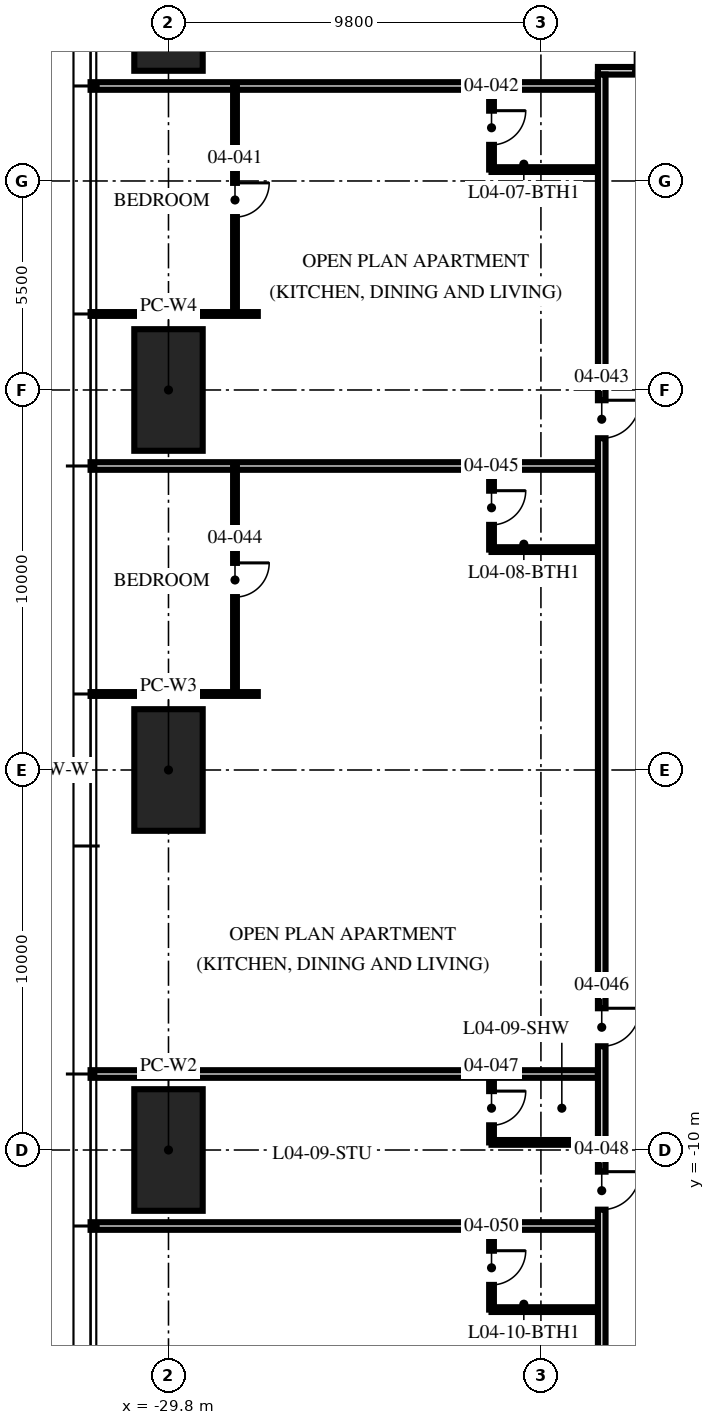
"""IFC4 building model, lengths in metres.
Left out: names, types, materials, properties, quantities, classifications, styles, units other than length and angle.
Written with IfcOpenShell. Run it as: python <this file> out.ifc"""

import sys

from ifc_helpers import new_model, si_unit, direction, frame, frame_2d, origin, origin_2d, place, context, subcontext, project, spatial, rectangle, hollow_rectangle, extrude, element, fill, save


model = new_model("IFC4")
c1 = context("Model", 3, precision=1e-05, world=origin(), true_north=direction((0.0, 1.0)))
c2 = subcontext(c1, "Body", "Model", "MODEL_VIEW")
j1 = project(units=[si_unit("LENGTHUNIT", "METRE"), si_unit("PLANEANGLEUNIT", "RADIAN")], contexts=[c1])
p1 = place(None, origin())
s1 = spatial("IfcSite", under=j1, at=p1, CompositionType="ELEMENT")
p2 = place(p1, origin())
s2 = spatial("IfcBuilding", under=s1, at=p2, CompositionType="ELEMENT")
p3 = place(p2, frame((0.0, 0.0, 21.0)))
s3 = spatial("IfcBuildingStorey", under=s2, at=p3, CompositionType="ELEMENT", Elevation=21.0)
for number, where, z_axis, x_axis in (
    (1, (-29.8, -10.0, 0.0), (0.0, 0.0, 1.0), (0.0, 1.0, 0.0)),
    (2, (-29.8, 0.0, 0.0), (0.0, 0.0, 1.0), (0.0, 1.0, 0.0)),
    (3, (-29.8, 10.0, 0.0), (0.0, 0.0, 1.0), (0.0, 1.0, 0.0)),
    (4, (-29.8, 20.0, 0.0), (0.0, 0.0, 1.0), (0.0, 1.0, 0.0)),
):
    element("IfcColumn", number, at=place(p3, frame(where, z_axis=z_axis, x_axis=x_axis)), inside=s3, PredefinedType="COLUMN", context=c2, shape_type="SweptSolid", body=[
        extrude(hollow_rectangle(XDim=3.2, YDim=1.8, WallThickness=0.2, at=origin_2d()), origin(), (0.0, 0.0, 1.0), 3.75),
    ])
p4 = place(p3, frame((-18.5, 18.0, 0.0), z_axis=(0.0, 0.0, 1.0), x_axis=(-1.0, 0.0, 0.0)))
e5 = element("IfcWall", 5, at=p4, inside=s3, PredefinedType="PARTITIONING", context=c2, shape_type="SweptSolid", body=[
    extrude(rectangle(XDim=13.35, YDim=0.2, at=frame_2d((6.675, 0.0))), origin(), (0.0, 0.0, 1.0), 2.3),
])
p5 = place(p3, frame((-27.45, 12.0, 0.0), z_axis=(0.0, 0.0, 1.0), x_axis=(-1.0, 0.0, 0.0)))
e6 = element("IfcWall", 6, at=p5, inside=s3, PredefinedType="PARTITIONING", context=c2, shape_type="SweptSolid", body=[
    extrude(rectangle(XDim=4.4, YDim=0.1, at=frame_2d((2.2, 0.0))), origin(), (0.0, 0.0, 1.0), 2.71),
])
p6 = place(p3, frame((-18.5, 8.0, 0.0), z_axis=(0.0, 0.0, 1.0), x_axis=(-1.0, 0.0, 0.0)))
e7 = element("IfcWall", 7, at=p6, inside=s3, PredefinedType="PARTITIONING", context=c2, shape_type="SweptSolid", body=[
    extrude(rectangle(XDim=13.35, YDim=0.2, at=frame_2d((6.675, 0.0))), origin(), (0.0, 0.0, 1.0), 2.71),
])
p7 = place(p3, frame((-27.45, 2.0, 0.0), z_axis=(0.0, 0.0, 1.0), x_axis=(-1.0, 0.0, 0.0)))
e8 = element("IfcWall", 8, at=p7, inside=s3, PredefinedType="PARTITIONING", context=c2, shape_type="SweptSolid", body=[
    extrude(rectangle(XDim=4.4, YDim=0.1, at=frame_2d((2.2, 0.0))), origin(), (0.0, 0.0, 1.0), 2.71),
])
for number, where, z_axis, x_axis in (
    (9, (-18.5, -8.0, 0.0), (0.0, 0.0, 1.0), (-1.0, 0.0, 0.0)),
    (10, (-18.5, -12.0, 0.0), (0.0, 0.0, 1.0), (-1.0, 0.0, 0.0)),
):
    element("IfcWall", number, at=place(p3, frame(where, z_axis=z_axis, x_axis=x_axis)), inside=s3, PredefinedType="PARTITIONING", context=c2, shape_type="SweptSolid", body=[
        extrude(rectangle(XDim=13.35, YDim=0.2, at=frame_2d((6.675, 0.0))), origin(), (0.0, 0.0, 1.0), 2.71),
    ])
p8 = place(p3, frame((-28.05, 18.0, 0.0), z_axis=(0.0, 0.0, 1.0), x_axis=(0.0, -1.0, 0.0)))
e11 = element("IfcWall", 11, at=p8, inside=s3, PredefinedType="PARTITIONING", context=c2, shape_type="SweptSolid", body=[
    extrude(rectangle(XDim=6.0, YDim=0.1, at=frame_2d((3.0, 0.0))), origin(), (0.0, 0.0, 1.0), 2.61),
])
p9 = place(p8, frame((2.55, 0.0, 0.0)))
e12 = element("IfcOpeningElement", 12, at=p9, cuts=e11, PredefinedType="OPENING", context=c2, shape_type="SweptSolid", body=[
    extrude(rectangle(XDim=0.9, YDim=2.1, at=frame_2d((0.45, 1.05))), frame((0.0, 0.06, 0.0), z_axis=(0.0, -1.0, 0.0), x_axis=(1.0, 0.0, 0.0)), (0.0, 0.0, 1.0), 0.12),
])
p10 = place(p3, frame((-21.3, 18.0, 0.0), z_axis=(0.0, 0.0, 1.0), x_axis=(0.0, -1.0, 0.0)))
e13 = element("IfcWall", 13, at=p10, inside=s3, PredefinedType="PARTITIONING", context=c2, shape_type="SweptSolid", body=[
    extrude(rectangle(XDim=2.2, YDim=0.125, at=frame_2d((1.1, 0.0))), origin(), (0.0, 0.0, 1.0), 3.5),
])
p11 = place(p10, frame((0.65, 0.0, 0.0)))
e14 = element("IfcOpeningElement", 14, at=p11, cuts=e13, PredefinedType="OPENING", context=c2, shape_type="SweptSolid", body=[
    extrude(rectangle(XDim=0.9, YDim=2.1, at=frame_2d((0.45, 1.05))), frame((0.0, 0.073, 0.0), z_axis=(0.0, -1.0, 0.0), x_axis=(1.0, 0.0, 0.0)), (0.0, 0.0, 1.0), 0.145),
])
p12 = place(p3, frame((-18.5, 15.8, 0.0), z_axis=(0.0, 0.0, 1.0), x_axis=(-1.0, 0.0, 0.0)))
e15 = element("IfcWall", 15, at=p12, inside=s3, PredefinedType="PARTITIONING", context=c2, shape_type="SweptSolid", body=[
    extrude(rectangle(XDim=2.8, YDim=0.125, at=frame_2d((1.4, 0.0))), origin(), (0.0, 0.0, 1.0), 3.5),
])
p13 = place(p3, frame((-28.05, 8.0, 0.0), z_axis=(0.0, 0.0, 1.0), x_axis=(0.0, -1.0, 0.0)))
e16 = element("IfcWall", 16, at=p13, inside=s3, PredefinedType="PARTITIONING", context=c2, shape_type="SweptSolid", body=[
    extrude(rectangle(XDim=6.0, YDim=0.1, at=frame_2d((3.0, 0.0))), origin(), (0.0, 0.0, 1.0), 2.61),
])
p14 = place(p13, frame((2.55, 0.0, 0.0)))
e17 = element("IfcOpeningElement", 17, at=p14, cuts=e16, PredefinedType="OPENING", context=c2, shape_type="SweptSolid", body=[
    extrude(rectangle(XDim=0.9, YDim=2.1, at=frame_2d((0.45, 1.05))), frame((0.0, 0.06, 0.0), z_axis=(0.0, -1.0, 0.0), x_axis=(1.0, 0.0, 0.0)), (0.0, 0.0, 1.0), 0.12),
])
p15 = place(p3, frame((-21.3, 8.0, 0.0), z_axis=(0.0, 0.0, 1.0), x_axis=(0.0, -1.0, 0.0)))
e18 = element("IfcWall", 18, at=p15, inside=s3, PredefinedType="PARTITIONING", context=c2, shape_type="SweptSolid", body=[
    extrude(rectangle(XDim=2.2, YDim=0.125, at=frame_2d((1.1, 0.0))), origin(), (0.0, 0.0, 1.0), 3.5),
])
p16 = place(p15, frame((0.65, 0.0, 0.0)))
e19 = element("IfcOpeningElement", 19, at=p16, cuts=e18, PredefinedType="OPENING", context=c2, shape_type="SweptSolid", body=[
    extrude(rectangle(XDim=0.9, YDim=2.1, at=frame_2d((0.45, 1.05))), frame((0.0, 0.073, 0.0), z_axis=(0.0, -1.0, 0.0), x_axis=(1.0, 0.0, 0.0)), (0.0, 0.0, 1.0), 0.145),
])
p17 = place(p3, frame((-18.5, 5.8, 0.0), z_axis=(0.0, 0.0, 1.0), x_axis=(-1.0, 0.0, 0.0)))
e20 = element("IfcWall", 20, at=p17, inside=s3, PredefinedType="PARTITIONING", context=c2, shape_type="SweptSolid", body=[
    extrude(rectangle(XDim=2.8, YDim=0.125, at=frame_2d((1.4, 0.0))), origin(), (0.0, 0.0, 1.0), 3.5),
])
p18 = place(p3, frame((-21.3, -8.0, 0.0), z_axis=(0.0, 0.0, 1.0), x_axis=(0.0, -1.0, 0.0)))
e21 = element("IfcWall", 21, at=p18, inside=s3, PredefinedType="PARTITIONING", context=c2, shape_type="SweptSolid", body=[
    extrude(rectangle(XDim=1.8, YDim=0.125, at=frame_2d((0.9, 0.0))), origin(), (0.0, 0.0, 1.0), 3.5),
])
p19 = place(p18, frame((0.45, 0.0, 0.0)))
e22 = element("IfcOpeningElement", 22, at=p19, cuts=e21, PredefinedType="OPENING", context=c2, shape_type="SweptSolid", body=[
    extrude(rectangle(XDim=0.9, YDim=2.1, at=frame_2d((0.45, 1.05))), frame((0.0, 0.073, 0.0), z_axis=(0.0, -1.0, 0.0), x_axis=(1.0, 0.0, 0.0)), (0.0, 0.0, 1.0), 0.145),
])
p20 = place(p3, frame((-18.5, -9.8, 0.0), z_axis=(0.0, 0.0, 1.0), x_axis=(-1.0, 0.0, 0.0)))
e23 = element("IfcWall", 23, at=p20, inside=s3, PredefinedType="PARTITIONING", context=c2, shape_type="SweptSolid", body=[
    extrude(rectangle(XDim=2.8, YDim=0.125, at=frame_2d((1.4, 0.0))), origin(), (0.0, 0.0, 1.0), 2.492),
])
p21 = place(p3, frame((-21.3, -12.0, 0.0), z_axis=(0.0, 0.0, 1.0), x_axis=(0.0, -1.0, 0.0)))
e24 = element("IfcWall", 24, at=p21, inside=s3, PredefinedType="PARTITIONING", context=c2, shape_type="SweptSolid", body=[
    extrude(rectangle(XDim=2.2, YDim=0.125, at=frame_2d((1.1, 0.0))), origin(), (0.0, 0.0, 1.0), 3.5),
])
p22 = place(p21, frame((0.65, 0.0, 0.0)))
e25 = element("IfcOpeningElement", 25, at=p22, cuts=e24, PredefinedType="OPENING", context=c2, shape_type="SweptSolid", body=[
    extrude(rectangle(XDim=0.9, YDim=2.1, at=frame_2d((0.45, 1.05))), frame((0.0, 0.073, 0.0), z_axis=(0.0, -1.0, 0.0), x_axis=(1.0, 0.0, 0.0)), (0.0, 0.0, 1.0), 0.145),
])
p23 = place(p3, frame((-18.5, -14.2, 0.0), z_axis=(0.0, 0.0, 1.0), x_axis=(-1.0, 0.0, 0.0)))
e26 = element("IfcWall", 26, at=p23, inside=s3, PredefinedType="PARTITIONING", context=c2, shape_type="SweptSolid", body=[
    extrude(rectangle(XDim=2.8, YDim=0.125, at=frame_2d((1.4, 0.0))), origin(), (0.0, 0.0, 1.0), 3.5),
])
p24 = place(p3, frame((-18.5, 18.4, 0.0), z_axis=(0.0, 0.0, 1.0), x_axis=(1.0, 0.0, 0.0)))
e27 = element("IfcWall", 27, at=p24, inside=s3, PredefinedType="PARTITIONING", context=c2, shape_type="SweptSolid", body=[
    extrude(rectangle(XDim=14.5, YDim=0.2, at=frame_2d((7.25, 0.0))), origin(), (0.0, 0.0, 1.0), 2.3),
])
p25 = place(p24, frame((0.98, 0.0, 0.0)))
e28 = element("IfcOpeningElement", 28, at=p25, cuts=e27, PredefinedType="OPENING", context=c2, shape_type="SweptSolid", body=[
    extrude(rectangle(XDim=1.0, YDim=2.2, at=frame_2d((0.5, 1.1))), frame((0.0, 0.11, 0.0), z_axis=(0.0, -1.0, 0.0), x_axis=(1.0, 0.0, 0.0)), (0.0, 0.0, 1.0), 0.22),
])
p26 = place(p3, frame((-18.4, 18.3, 0.0), z_axis=(0.0, 0.0, 1.0), x_axis=(0.0, -1.0, 0.0)))
e29 = element("IfcWall", 29, at=p26, inside=s3, PredefinedType="PARTITIONING", context=c2, shape_type="SweptSolid", body=[
    extrude(rectangle(XDim=36.6, YDim=0.2, at=frame_2d((18.3, 0.0))), origin(), (0.0, 0.0, 1.0), 2.3),
])
p27 = place(p26, frame((8.57, 0.0, 0.0)))
e30 = element("IfcOpeningElement", 30, at=p27, cuts=e29, PredefinedType="OPENING", context=c2, shape_type="SweptSolid", body=[
    extrude(rectangle(XDim=1.0, YDim=2.2, at=frame_2d((0.5, 1.1))), frame((0.0, 0.11, 0.0), z_axis=(0.0, -1.0, 0.0), x_axis=(1.0, 0.0, 0.0)), (0.0, 0.0, 1.0), 0.22),
])
p28 = place(p26, frame((24.57, 0.0, 0.0)))
e31 = element("IfcOpeningElement", 31, at=p28, cuts=e29, PredefinedType="OPENING", context=c2, shape_type="SweptSolid", body=[
    extrude(rectangle(XDim=1.0, YDim=2.2, at=frame_2d((0.5, 1.1))), frame((0.0, 0.11, 0.0), z_axis=(0.0, -1.0, 0.0), x_axis=(1.0, 0.0, 0.0)), (0.0, 0.0, 1.0), 0.22),
])
p29 = place(p26, frame((28.87, 0.0, 0.0)))
e32 = element("IfcOpeningElement", 32, at=p29, cuts=e29, PredefinedType="OPENING", context=c2, shape_type="SweptSolid", body=[
    extrude(rectangle(XDim=1.0, YDim=2.2, at=frame_2d((0.5, 1.1))), frame((0.0, 0.11, 0.0), z_axis=(0.0, -1.0, 0.0), x_axis=(1.0, 0.0, 0.0)), (0.0, 0.0, 1.0), 0.22),
])
p30 = place(p26, frame((34.82, 0.0, 0.0)))
e33 = element("IfcOpeningElement", 33, at=p30, cuts=e29, PredefinedType="OPENING", context=c2, shape_type="SweptSolid", body=[
    extrude(rectangle(XDim=1.0, YDim=2.2, at=frame_2d((0.5, 1.1))), frame((0.0, 0.11, 0.0), z_axis=(0.0, -1.0, 0.0), x_axis=(1.0, 0.0, 0.0)), (0.0, 0.0, 1.0), 0.22),
])
p31 = place(p25, origin())
e34 = element("IfcDoor", 34, at=p31, inside=s3, OperationType="SINGLE_SWING_LEFT", PredefinedType="DOOR", context=c2, shape_type="SweptSolid", body=[
    extrude(rectangle(XDim=1.0, YDim=2.2, at=frame_2d((0.5, 1.1))), frame((0.0, 0.025, 0.0), z_axis=(0.0, -1.0, 0.0), x_axis=(1.0, 0.0, 0.0)), (0.0, 0.0, 1.0), 0.05),
])
fill(e28, e34)
p32 = place(p9, origin())
e35 = element("IfcDoor", 35, at=p32, inside=s3, OperationType="SINGLE_SWING_LEFT", PredefinedType="DOOR", context=c2, shape_type="SweptSolid", body=[
    extrude(rectangle(XDim=0.9, YDim=2.1, at=frame_2d((0.45, 1.05))), frame((0.0, 0.025, 0.0), z_axis=(0.0, -1.0, 0.0), x_axis=(1.0, 0.0, 0.0)), (0.0, 0.0, 1.0), 0.05),
])
fill(e12, e35)
p33 = place(p11, origin())
e36 = element("IfcDoor", 36, at=p33, inside=s3, OperationType="SINGLE_SWING_LEFT", PredefinedType="DOOR", context=c2, shape_type="SweptSolid", body=[
    extrude(rectangle(XDim=0.9, YDim=2.1, at=frame_2d((0.45, 1.05))), frame((0.0, 0.025, 0.0), z_axis=(0.0, -1.0, 0.0), x_axis=(1.0, 0.0, 0.0)), (0.0, 0.0, 1.0), 0.05),
])
fill(e14, e36)
p34 = place(p27, origin())
e37 = element("IfcDoor", 37, at=p34, inside=s3, OperationType="SINGLE_SWING_LEFT", PredefinedType="DOOR", context=c2, shape_type="SweptSolid", body=[
    extrude(rectangle(XDim=1.0, YDim=2.2, at=frame_2d((0.5, 1.1))), frame((0.0, 0.025, 0.0), z_axis=(0.0, -1.0, 0.0), x_axis=(1.0, 0.0, 0.0)), (0.0, 0.0, 1.0), 0.05),
])
fill(e30, e37)
p35 = place(p14, origin())
e38 = element("IfcDoor", 38, at=p35, inside=s3, OperationType="SINGLE_SWING_LEFT", PredefinedType="DOOR", context=c2, shape_type="SweptSolid", body=[
    extrude(rectangle(XDim=0.9, YDim=2.1, at=frame_2d((0.45, 1.05))), frame((0.0, 0.025, 0.0), z_axis=(0.0, -1.0, 0.0), x_axis=(1.0, 0.0, 0.0)), (0.0, 0.0, 1.0), 0.05),
])
fill(e17, e38)
p36 = place(p16, origin())
e39 = element("IfcDoor", 39, at=p36, inside=s3, OperationType="SINGLE_SWING_LEFT", PredefinedType="DOOR", context=c2, shape_type="SweptSolid", body=[
    extrude(rectangle(XDim=0.9, YDim=2.1, at=frame_2d((0.45, 1.05))), frame((0.0, 0.025, 0.0), z_axis=(0.0, -1.0, 0.0), x_axis=(1.0, 0.0, 0.0)), (0.0, 0.0, 1.0), 0.05),
])
fill(e19, e39)
p37 = place(p28, origin())
e40 = element("IfcDoor", 40, at=p37, inside=s3, OperationType="SINGLE_SWING_LEFT", PredefinedType="DOOR", context=c2, shape_type="SweptSolid", body=[
    extrude(rectangle(XDim=1.0, YDim=2.2, at=frame_2d((0.5, 1.1))), frame((0.0, 0.025, 0.0), z_axis=(0.0, -1.0, 0.0), x_axis=(1.0, 0.0, 0.0)), (0.0, 0.0, 1.0), 0.05),
])
fill(e31, e40)
p38 = place(p19, origin())
e41 = element("IfcDoor", 41, at=p38, inside=s3, OperationType="SINGLE_SWING_LEFT", PredefinedType="DOOR", context=c2, shape_type="SweptSolid", body=[
    extrude(rectangle(XDim=0.9, YDim=2.1, at=frame_2d((0.45, 1.05))), frame((0.0, 0.025, 0.0), z_axis=(0.0, -1.0, 0.0), x_axis=(1.0, 0.0, 0.0)), (0.0, 0.0, 1.0), 0.05),
])
fill(e22, e41)
p39 = place(p29, origin())
e42 = element("IfcDoor", 42, at=p39, inside=s3, OperationType="SINGLE_SWING_LEFT", PredefinedType="DOOR", context=c2, shape_type="SweptSolid", body=[
    extrude(rectangle(XDim=1.0, YDim=2.2, at=frame_2d((0.5, 1.1))), frame((0.0, 0.025, 0.0), z_axis=(0.0, -1.0, 0.0), x_axis=(1.0, 0.0, 0.0)), (0.0, 0.0, 1.0), 0.05),
])
fill(e32, e42)
p40 = place(p22, origin())
e43 = element("IfcDoor", 43, at=p40, inside=s3, OperationType="SINGLE_SWING_LEFT", PredefinedType="DOOR", context=c2, shape_type="SweptSolid", body=[
    extrude(rectangle(XDim=0.9, YDim=2.1, at=frame_2d((0.45, 1.05))), frame((0.0, 0.025, 0.0), z_axis=(0.0, -1.0, 0.0), x_axis=(1.0, 0.0, 0.0)), (0.0, 0.0, 1.0), 0.05),
])
fill(e25, e43)
save(model, sys.argv[1])
